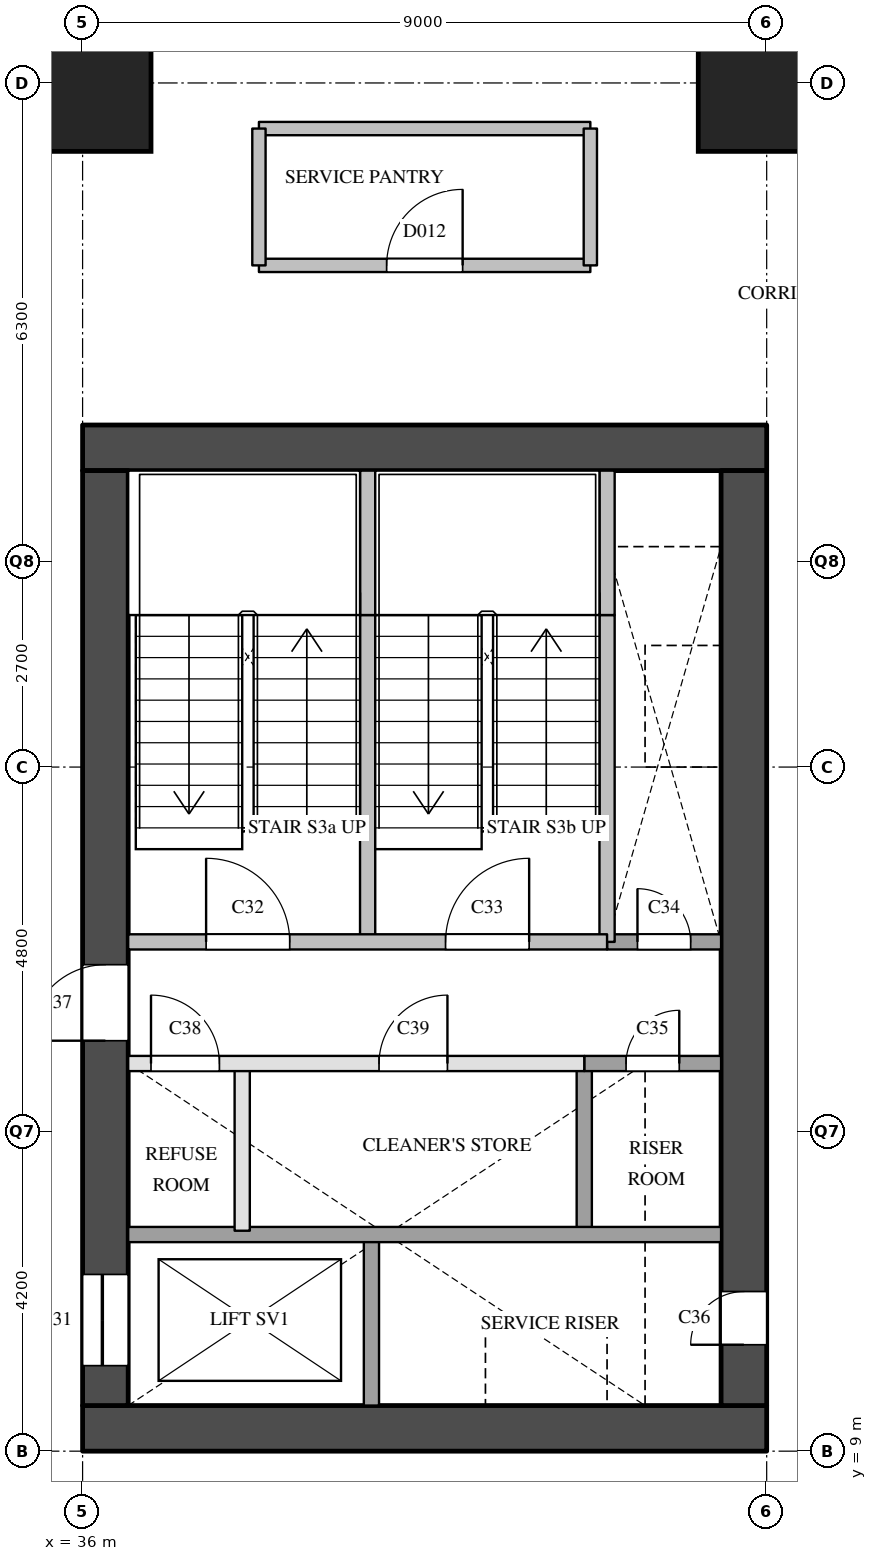
"""IFC4 building model, lengths in metres.
Left out: names, types, materials, properties, quantities, classifications, styles, units other than length and angle.
Written with IfcOpenShell. Run it as: python <this file> out.ifc"""

import sys

from ifc_helpers import new_model, si_unit, direction, frame, frame_2d, origin, origin_2d, place, context, subcontext, project, spatial, rectangle, extrude, element, fill, save


model = new_model("IFC4")
c1 = context("Model", 3, precision=1e-05, world=origin(), true_north=direction((0.0, 1.0)))
c2 = subcontext(c1, "Body", "Model", "MODEL_VIEW")
j1 = project(units=[si_unit("LENGTHUNIT", "METRE"), si_unit("PLANEANGLEUNIT", "RADIAN")], contexts=[c1])
p1 = place(None, origin())
s1 = spatial("IfcSite", under=j1, at=p1, CompositionType="ELEMENT")
p2 = place(p1, origin())
s2 = spatial("IfcBuilding", under=s1, at=p2, CompositionType="ELEMENT")
p3 = place(p2, frame((0.0, 0.0, 93.0)))
s3 = spatial("IfcBuildingStorey", under=s2, at=p3, CompositionType="ELEMENT", Elevation=93.0)
for number, where, z_axis, x_axis in (
    (1, (36.0, 27.0, 0.0), (0.0, 0.0, 1.0), (1.0, 0.0, 0.0)),
    (2, (45.0, 27.0, 0.0), (0.0, 0.0, 1.0), (1.0, 0.0, 0.0)),
):
    element("IfcColumn", number, at=place(p3, frame(where, z_axis=z_axis, x_axis=x_axis)), inside=s3, PredefinedType="COLUMN", context=c2, shape_type="SweptSolid", body=[
        extrude(rectangle(XDim=1.8, YDim=1.8, at=origin_2d()), origin(), (0.0, 0.0, 1.0), 3.8),
    ])
for number, where, z_axis, x_axis in (
    (3, (36.0, 9.3, 0.0), (0.0, 0.0, 1.0), (1.0, 0.0, 0.0)),
    (4, (36.0, 22.2, 0.0), (0.0, 0.0, 1.0), (1.0, 0.0, 0.0)),
):
    element("IfcWall", number, at=place(p3, frame(where, z_axis=z_axis, x_axis=x_axis)), inside=s3, PredefinedType="SHEAR", context=c2, shape_type="SweptSolid", body=[
        extrude(rectangle(XDim=9.0, YDim=0.6, at=frame_2d((4.5, 0.0))), origin(), (0.0, 0.0, 1.0), 3.5),
    ])
p4 = place(p3, frame((36.3, 9.6, 0.0), z_axis=(0.0, 0.0, 1.0), x_axis=(0.0, 1.0, 0.0)))
e5 = element("IfcWall", 5, at=p4, inside=s3, PredefinedType="SHEAR", context=c2, shape_type="SweptSolid", body=[
    extrude(rectangle(XDim=12.3, YDim=0.6, at=frame_2d((6.15, 0.0))), origin(), (0.0, 0.0, 1.0), 3.5),
])
p5 = place(p4, frame((0.525, 0.0, 0.0)))
e6 = element("IfcOpeningElement", 6, at=p5, cuts=e5, PredefinedType="OPENING", context=c2, shape_type="SweptSolid", body=[
    extrude(rectangle(XDim=1.2, YDim=2.1, at=frame_2d((0.6, 1.05))), frame((0.0, 0.31, 0.0), z_axis=(0.0, -1.0, 0.0), x_axis=(1.0, 0.0, 0.0)), (0.0, 0.0, 1.0), 0.62),
])
p6 = place(p4, frame((4.8, 0.0, 0.0)))
e7 = element("IfcOpeningElement", 7, at=p6, cuts=e5, PredefinedType="OPENING", context=c2, shape_type="SweptSolid", body=[
    extrude(rectangle(XDim=1.0, YDim=2.1, at=frame_2d((0.5, 1.05))), frame((0.0, 0.31, 0.0), z_axis=(0.0, -1.0, 0.0), x_axis=(1.0, 0.0, 0.0)), (0.0, 0.0, 1.0), 0.62),
])
p7 = place(p3, frame((44.7, 9.6, 0.0), z_axis=(0.0, 0.0, 1.0), x_axis=(0.0, 1.0, 0.0)))
e8 = element("IfcWall", 8, at=p7, inside=s3, PredefinedType="SHEAR", context=c2, shape_type="SweptSolid", body=[
    extrude(rectangle(XDim=12.3, YDim=0.6, at=frame_2d((6.15, 0.0))), origin(), (0.0, 0.0, 1.0), 3.5),
])
p8 = place(p7, frame((0.8, 0.0, 0.0)))
e9 = element("IfcOpeningElement", 9, at=p8, cuts=e8, PredefinedType="OPENING", context=c2, shape_type="SweptSolid", body=[
    extrude(rectangle(XDim=0.7, YDim=2.1, at=frame_2d((0.35, 1.05))), frame((0.0, 0.31, 0.0), z_axis=(0.0, -1.0, 0.0), x_axis=(1.0, 0.0, 0.0)), (0.0, 0.0, 1.0), 0.62),
])
p9 = place(p3, frame((38.1, 11.9, 0.0), z_axis=(0.0, 0.0, 1.0), x_axis=(0.0, 1.0, 0.0)))
e10 = element("IfcWall", 10, at=p9, inside=s3, PredefinedType="PARTITIONING", context=c2, shape_type="SweptSolid", body=[
    extrude(rectangle(XDim=2.2, YDim=0.2, at=frame_2d((1.1, 0.0))), origin(), (0.0, 0.0, 1.0), 3.5),
])
p10 = place(p3, frame((39.75, 15.7, 0.0), z_axis=(0.0, 0.0, 1.0), x_axis=(0.0, 1.0, 0.0)))
e11 = element("IfcWall", 11, at=p10, inside=s3, PredefinedType="SOLIDWALL", context=c2, shape_type="SweptSolid", body=[
    extrude(rectangle(XDim=4.3, YDim=0.2, at=frame_2d((2.15, 0.0))), origin(), (0.0, 0.0, 1.0), 3.5),
])
p11 = place(p3, frame((39.75, 20.0, 0.0), z_axis=(0.0, 0.0, 1.0), x_axis=(0.0, 1.0, 0.0)))
e12 = element("IfcWall", 12, at=p11, inside=s3, PredefinedType="SOLIDWALL", context=c2, shape_type="SweptSolid", body=[
    extrude(rectangle(XDim=1.9, YDim=0.2, at=frame_2d((0.95, 0.0))), origin(), (0.0, 0.0, 1.0), 3.5),
])
p12 = place(p3, frame((39.8, 9.6, 0.0), z_axis=(0.0, 0.0, 1.0), x_axis=(0.0, 1.0, 0.0)))
e13 = element("IfcWall", 13, at=p12, inside=s3, PredefinedType="SOLIDWALL", context=c2, shape_type="SweptSolid", body=[
    extrude(rectangle(XDim=2.3, YDim=0.2, at=frame_2d((1.15, 0.0))), origin(), (0.0, 0.0, 1.0), 3.5),
])
p13 = place(p3, frame((42.6, 11.9, 0.0), z_axis=(0.0, 0.0, 1.0), x_axis=(0.0, 1.0, 0.0)))
e14 = element("IfcWall", 14, at=p13, inside=s3, PredefinedType="SOLIDWALL", context=c2, shape_type="SweptSolid", body=[
    extrude(rectangle(XDim=2.2, YDim=0.2, at=frame_2d((1.1, 0.0))), origin(), (0.0, 0.0, 1.0), 3.5),
])
p14 = place(p3, frame((42.9, 15.7, 0.0), z_axis=(0.0, 0.0, 1.0), x_axis=(0.0, 1.0, 0.0)))
e15 = element("IfcWall", 15, at=p14, inside=s3, PredefinedType="SOLIDWALL", context=c2, shape_type="SweptSolid", body=[
    extrude(rectangle(XDim=4.3, YDim=0.2, at=frame_2d((2.15, 0.0))), origin(), (0.0, 0.0, 1.0), 3.5),
])
p15 = place(p3, frame((42.9, 20.0, 0.0), z_axis=(0.0, 0.0, 1.0), x_axis=(0.0, 1.0, 0.0)))
e16 = element("IfcWall", 16, at=p15, inside=s3, PredefinedType="SOLIDWALL", context=c2, shape_type="SweptSolid", body=[
    extrude(rectangle(XDim=1.9, YDim=0.2, at=frame_2d((0.95, 0.0))), origin(), (0.0, 0.0, 1.0), 3.5),
])
p16 = place(p3, frame((36.6, 11.85, 0.0), z_axis=(0.0, 0.0, 1.0), x_axis=(1.0, 0.0, 0.0)))
e17 = element("IfcWall", 17, at=p16, inside=s3, PredefinedType="SOLIDWALL", context=c2, shape_type="SweptSolid", body=[
    extrude(rectangle(XDim=7.8, YDim=0.2, at=frame_2d((3.9, 0.0))), origin(), (0.0, 0.0, 1.0), 3.5),
])
p17 = place(p3, frame((36.6, 14.1, 0.0), z_axis=(0.0, 0.0, 1.0), x_axis=(1.0, 0.0, 0.0)))
e18 = element("IfcWall", 18, at=p17, inside=s3, PredefinedType="PARTITIONING", context=c2, shape_type="SweptSolid", body=[
    extrude(rectangle(XDim=6.0, YDim=0.2, at=frame_2d((3.0, 0.0))), origin(), (0.0, 0.0, 1.0), 3.5),
])
p18 = place(p17, frame((0.3, 0.0, 0.0)))
e19 = element("IfcOpeningElement", 19, at=p18, cuts=e18, PredefinedType="OPENING", context=c2, shape_type="SweptSolid", body=[
    extrude(rectangle(XDim=0.9, YDim=2.1, at=frame_2d((0.45, 1.05))), frame((0.0, 0.11, 0.0), z_axis=(0.0, -1.0, 0.0), x_axis=(1.0, 0.0, 0.0)), (0.0, 0.0, 1.0), 0.22),
])
p19 = place(p17, frame((3.3, 0.0, 0.0)))
e20 = element("IfcOpeningElement", 20, at=p19, cuts=e18, PredefinedType="OPENING", context=c2, shape_type="SweptSolid", body=[
    extrude(rectangle(XDim=0.9, YDim=2.1, at=frame_2d((0.45, 1.05))), frame((0.0, 0.11, 0.0), z_axis=(0.0, -1.0, 0.0), x_axis=(1.0, 0.0, 0.0)), (0.0, 0.0, 1.0), 0.22),
])
p20 = place(p3, frame((42.6, 14.1, 0.0), z_axis=(0.0, 0.0, 1.0), x_axis=(1.0, 0.0, 0.0)))
e21 = element("IfcWall", 21, at=p20, inside=s3, PredefinedType="SOLIDWALL", context=c2, shape_type="SweptSolid", body=[
    extrude(rectangle(XDim=1.8, YDim=0.2, at=frame_2d((0.9, 0.0))), origin(), (0.0, 0.0, 1.0), 3.5),
])
p21 = place(p20, frame((0.55, 0.0, 0.0)))
e22 = element("IfcOpeningElement", 22, at=p21, cuts=e21, PredefinedType="OPENING", context=c2, shape_type="SweptSolid", body=[
    extrude(rectangle(XDim=0.7, YDim=2.1, at=frame_2d((0.35, 1.05))), frame((0.0, 0.11, 0.0), z_axis=(0.0, -1.0, 0.0), x_axis=(1.0, 0.0, 0.0)), (0.0, 0.0, 1.0), 0.22),
])
p22 = place(p3, frame((42.9, 15.7, 0.0), z_axis=(0.0, 0.0, 1.0), x_axis=(1.0, 0.0, 0.0)))
e23 = element("IfcWall", 23, at=p22, inside=s3, PredefinedType="SOLIDWALL", context=c2, shape_type="SweptSolid", body=[
    extrude(rectangle(XDim=1.5, YDim=0.2, at=frame_2d((0.75, 0.0))), origin(), (0.0, 0.0, 1.0), 3.5),
])
p23 = place(p22, frame((0.4, 0.0, 0.0)))
e24 = element("IfcOpeningElement", 24, at=p23, cuts=e23, PredefinedType="OPENING", context=c2, shape_type="SweptSolid", body=[
    extrude(rectangle(XDim=0.7, YDim=2.1, at=frame_2d((0.35, 1.05))), frame((0.0, 0.11, 0.0), z_axis=(0.0, -1.0, 0.0), x_axis=(1.0, 0.0, 0.0)), (0.0, 0.0, 1.0), 0.22),
])
p24 = place(p3, frame((36.6, 15.7, 0.0), z_axis=(0.0, 0.0, 1.0), x_axis=(1.0, 0.0, 0.0)))
e25 = element("IfcWall", 25, at=p24, inside=s3, PredefinedType="SOLIDWALL", context=c2, shape_type="SweptSolid", body=[
    extrude(rectangle(XDim=6.3, YDim=0.2, at=frame_2d((3.15, 0.0))), origin(), (0.0, 0.0, 1.0), 3.5),
])
p25 = place(p24, frame((1.025, 0.0, 0.0)))
e26 = element("IfcOpeningElement", 26, at=p25, cuts=e25, PredefinedType="OPENING", context=c2, shape_type="SweptSolid", body=[
    extrude(rectangle(XDim=1.1, YDim=2.1, at=frame_2d((0.55, 1.05))), frame((0.0, 0.11, 0.0), z_axis=(0.0, -1.0, 0.0), x_axis=(1.0, 0.0, 0.0)), (0.0, 0.0, 1.0), 0.22),
])
p26 = place(p24, frame((4.175, 0.0, 0.0)))
e27 = element("IfcOpeningElement", 27, at=p26, cuts=e25, PredefinedType="OPENING", context=c2, shape_type="SweptSolid", body=[
    extrude(rectangle(XDim=1.1, YDim=2.1, at=frame_2d((0.55, 1.05))), frame((0.0, 0.11, 0.0), z_axis=(0.0, -1.0, 0.0), x_axis=(1.0, 0.0, 0.0)), (0.0, 0.0, 1.0), 0.22),
])
p27 = place(p3, frame((38.32, 24.6, 0.0), z_axis=(0.0, 0.0, 1.0), x_axis=(1.0, 0.0, 0.0)))
e28 = element("IfcWall", 28, at=p27, inside=s3, PredefinedType="PARTITIONING", context=c2, shape_type="SweptSolid", body=[
    extrude(rectangle(XDim=4.36, YDim=0.175, at=frame_2d((2.18, 0.0))), origin(), (0.0, 0.0, 1.0), 3.5),
])
p28 = place(p27, frame((1.68, 0.0, 0.0)))
e29 = element("IfcOpeningElement", 29, at=p28, cuts=e28, PredefinedType="OPENING", context=c2, shape_type="SweptSolid", body=[
    extrude(rectangle(XDim=1.0, YDim=2.1, at=frame_2d((0.5, 1.05))), frame((0.0, 0.097, 0.0), z_axis=(0.0, -1.0, 0.0), x_axis=(1.0, 0.0, 0.0)), (0.0, 0.0, 1.0), 0.195),
])
p29 = place(p3, frame((38.32, 26.4, 0.0), z_axis=(0.0, 0.0, 1.0), x_axis=(1.0, 0.0, 0.0)))
e30 = element("IfcWall", 30, at=p29, inside=s3, PredefinedType="PARTITIONING", context=c2, shape_type="SweptSolid", body=[
    extrude(rectangle(XDim=4.36, YDim=0.175, at=frame_2d((2.18, 0.0))), origin(), (0.0, 0.0, 1.0), 3.5),
])
for number, where, z_axis, x_axis in (
    (31, (38.32, 24.6, 0.0), (0.0, 0.0, 1.0), (0.0, 1.0, 0.0)),
    (32, (42.68, 24.6, 0.0), (0.0, 0.0, 1.0), (0.0, 1.0, 0.0)),
):
    element("IfcWall", number, at=place(p3, frame(where, z_axis=z_axis, x_axis=x_axis)), inside=s3, PredefinedType="PARTITIONING", context=c2, shape_type="SweptSolid", body=[
        extrude(rectangle(XDim=1.8, YDim=0.175, at=frame_2d((0.9, 0.0))), origin(), (0.0, 0.0, 1.0), 3.5),
    ])
p30 = place(p5, origin())
e33 = element("IfcDoor", 33, at=p30, inside=s3, OperationType="SLIDING_TO_LEFT", PredefinedType="DOOR", context=c2, shape_type="SweptSolid", body=[
    extrude(rectangle(XDim=1.2, YDim=2.1, at=frame_2d((0.6, 1.05))), frame((0.0, 0.025, 0.0), z_axis=(0.0, -1.0, 0.0), x_axis=(1.0, 0.0, 0.0)), (0.0, 0.0, 1.0), 0.05),
])
fill(e6, e33)
p31 = place(p25, origin())
e34 = element("IfcDoor", 34, at=p31, inside=s3, OperationType="SINGLE_SWING_LEFT", PredefinedType="DOOR", context=c2, shape_type="SweptSolid", body=[
    extrude(rectangle(XDim=1.1, YDim=2.1, at=frame_2d((0.55, 1.05))), frame((0.0, 0.025, 0.0), z_axis=(0.0, -1.0, 0.0), x_axis=(1.0, 0.0, 0.0)), (0.0, 0.0, 1.0), 0.05),
])
fill(e26, e34)
p32 = place(p26, origin())
e35 = element("IfcDoor", 35, at=p32, inside=s3, OperationType="SINGLE_SWING_RIGHT", PredefinedType="DOOR", context=c2, shape_type="SweptSolid", body=[
    extrude(rectangle(XDim=1.1, YDim=2.1, at=frame_2d((0.55, 1.05))), frame((0.0, 0.025, 0.0), z_axis=(0.0, -1.0, 0.0), x_axis=(1.0, 0.0, 0.0)), (0.0, 0.0, 1.0), 0.05),
])
fill(e27, e35)
p33 = place(p23, origin())
e36 = element("IfcDoor", 36, at=p33, inside=s3, OperationType="SINGLE_SWING_LEFT", PredefinedType="DOOR", context=c2, shape_type="SweptSolid", body=[
    extrude(rectangle(XDim=0.7, YDim=2.1, at=frame_2d((0.35, 1.05))), frame((0.0, 0.025, 0.0), z_axis=(0.0, -1.0, 0.0), x_axis=(1.0, 0.0, 0.0)), (0.0, 0.0, 1.0), 0.05),
])
fill(e24, e36)
p34 = place(p21, origin())
e37 = element("IfcDoor", 37, at=p34, inside=s3, OperationType="SINGLE_SWING_RIGHT", PredefinedType="DOOR", context=c2, shape_type="SweptSolid", body=[
    extrude(rectangle(XDim=0.7, YDim=2.1, at=frame_2d((0.35, 1.05))), frame((0.0, 0.025, 0.0), z_axis=(0.0, -1.0, 0.0), x_axis=(1.0, 0.0, 0.0)), (0.0, 0.0, 1.0), 0.05),
])
fill(e22, e37)
p35 = place(p8, origin())
e38 = element("IfcDoor", 38, at=p35, inside=s3, OperationType="SINGLE_SWING_LEFT", PredefinedType="DOOR", context=c2, shape_type="SweptSolid", body=[
    extrude(rectangle(XDim=0.7, YDim=2.1, at=frame_2d((0.35, 1.05))), frame((0.0, 0.025, 0.0), z_axis=(0.0, -1.0, 0.0), x_axis=(1.0, 0.0, 0.0)), (0.0, 0.0, 1.0), 0.05),
])
fill(e9, e38)
p36 = place(p6, origin())
e39 = element("IfcDoor", 39, at=p36, inside=s3, OperationType="SINGLE_SWING_LEFT", PredefinedType="DOOR", context=c2, shape_type="SweptSolid", body=[
    extrude(rectangle(XDim=1.0, YDim=2.1, at=frame_2d((0.5, 1.05))), frame((0.0, 0.025, 0.0), z_axis=(0.0, -1.0, 0.0), x_axis=(1.0, 0.0, 0.0)), (0.0, 0.0, 1.0), 0.05),
])
fill(e7, e39)
p37 = place(p18, origin())
e40 = element("IfcDoor", 40, at=p37, inside=s3, OperationType="SINGLE_SWING_LEFT", PredefinedType="DOOR", context=c2, shape_type="SweptSolid", body=[
    extrude(rectangle(XDim=0.9, YDim=2.1, at=frame_2d((0.45, 1.05))), frame((0.0, 0.025, 0.0), z_axis=(0.0, -1.0, 0.0), x_axis=(1.0, 0.0, 0.0)), (0.0, 0.0, 1.0), 0.05),
])
fill(e19, e40)
p38 = place(p19, origin())
e41 = element("IfcDoor", 41, at=p38, inside=s3, OperationType="SINGLE_SWING_RIGHT", PredefinedType="DOOR", context=c2, shape_type="SweptSolid", body=[
    extrude(rectangle(XDim=0.9, YDim=2.1, at=frame_2d((0.45, 1.05))), frame((0.0, 0.025, 0.0), z_axis=(0.0, -1.0, 0.0), x_axis=(1.0, 0.0, 0.0)), (0.0, 0.0, 1.0), 0.05),
])
fill(e20, e41)
p39 = place(p28, origin())
e42 = element("IfcDoor", 42, at=p39, inside=s3, OperationType="SINGLE_SWING_RIGHT", PredefinedType="DOOR", context=c2, shape_type="SweptSolid", body=[
    extrude(rectangle(XDim=1.0, YDim=2.1, at=frame_2d((0.5, 1.05))), frame((0.0, 0.025, 0.0), z_axis=(0.0, -1.0, 0.0), x_axis=(1.0, 0.0, 0.0)), (0.0, 0.0, 1.0), 0.05),
])
fill(e29, e42)
save(model, sys.argv[1])
